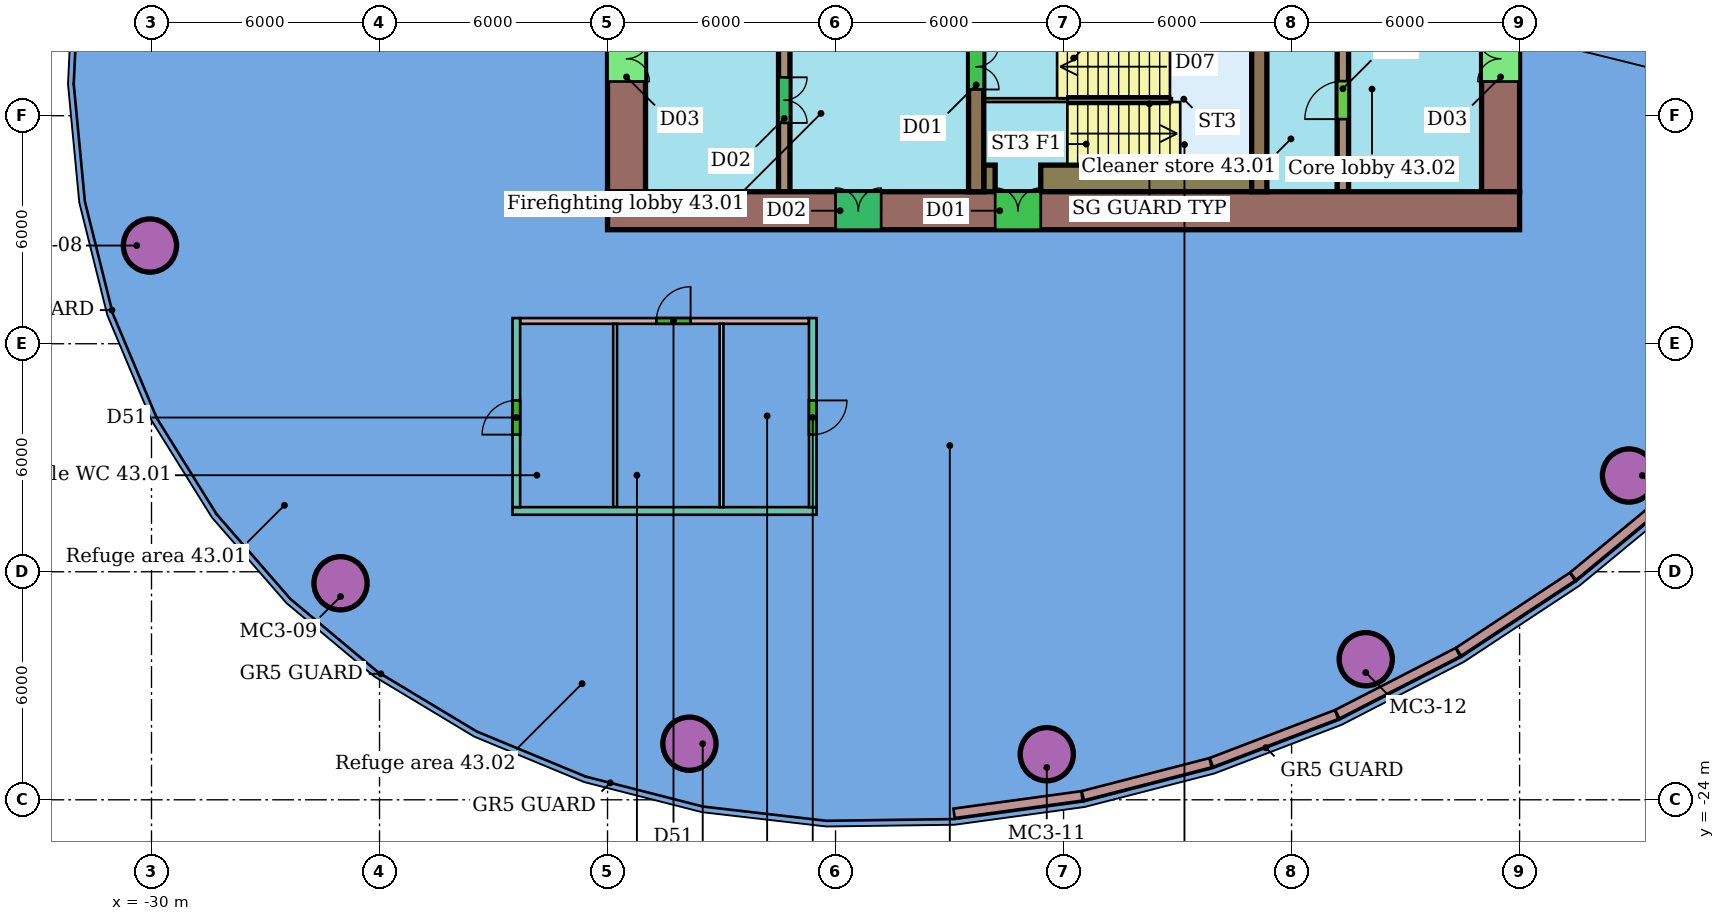
"""IFC4 building model, lengths in metres.
Left out: names, types, materials, properties, quantities, classifications, styles, units other than length and angle.
Written with IfcOpenShell. Run it as: python <this file> out.ifc"""

import sys

from ifc_helpers import new_model, si_unit, direction, frame, frame_2d, origin, origin_2d, place, context, subcontext, project, spatial, rectangle, hollow_circle, extrude, element, fill, save


model = new_model("IFC4")
c1 = context("Model", 3, precision=1e-05, world=origin(), true_north=direction((0.0, 1.0)))
c2 = subcontext(c1, "Body", "Model", "MODEL_VIEW")
j1 = project(units=[si_unit("LENGTHUNIT", "METRE"), si_unit("PLANEANGLEUNIT", "RADIAN")], contexts=[c1])
p1 = place(None, origin())
s1 = spatial("IfcSite", under=j1, at=p1, CompositionType="ELEMENT")
p2 = place(p1, origin())
s2 = spatial("IfcBuilding", under=s1, at=p2, CompositionType="ELEMENT")
p3 = place(p2, frame((0.0, 0.0, 179.4)))
s3 = spatial("IfcBuildingStorey", under=s2, at=p3, CompositionType="ELEMENT", Elevation=179.4)
for number, where, z_axis, x_axis in (
    (1, (-30.041, -9.417, 0.0), (0.0, 0.0, 1.0), (1.0, 0.0, 0.0)),
    (2, (-25.026, -18.303, 0.0), (0.0, 0.0, 1.0), (1.0, 0.0, 0.0)),
    (3, (-15.845, -22.524, 0.0), (0.0, 0.0, 1.0), (1.0, 0.0, 0.0)),
    (4, (-6.442, -22.8, 0.0), (0.0, 0.0, 1.0), (1.0, 0.0, 0.0)),
    (5, (1.952, -20.301, 0.0), (0.0, 0.0, 1.0), (1.0, 0.0, 0.0)),
    (6, (8.879, -15.467, 0.0), (0.0, 0.0, 1.0), (1.0, 0.0, 0.0)),
):
    element("IfcColumn", number, at=place(p3, frame(where, z_axis=z_axis, x_axis=x_axis)), inside=s3, PredefinedType="COLUMN", context=c2, shape_type="SweptSolid", body=[
        extrude(hollow_circle(Radius=0.7, WallThickness=0.05, at=origin_2d()), origin(), (0.0, 0.0, 1.0), 3.45),
    ])
p4 = place(p3, frame((-20.3, -11.4, 0.0), z_axis=(0.0, 0.0, 1.0), x_axis=(1.0, 0.0, 0.0)))
e7 = element("IfcWall", 7, at=p4, inside=s3, PredefinedType="PARTITIONING", context=c2, shape_type="SweptSolid", body=[
    extrude(rectangle(XDim=7.6, YDim=0.15, at=frame_2d((3.8, 0.0))), origin(), (0.0, 0.0, 1.0), 2.862),
])
p5 = place(p4, frame((3.586, 0.0, 0.0)))
e8 = element("IfcOpeningElement", 8, at=p5, cuts=e7, PredefinedType="OPENING", context=c2, shape_type="SweptSolid", body=[
    extrude(rectangle(XDim=0.9, YDim=2.1, at=frame_2d((0.45, 1.05))), frame((0.0, 0.085, 0.0), z_axis=(0.0, -1.0, 0.0), x_axis=(1.0, 0.0, 0.0)), (0.0, 0.0, 1.0), 0.17),
])
p6 = place(p3, frame((-17.8, -16.3, 0.0), z_axis=(0.0, 0.0, 1.0), x_axis=(0.0, 1.0, 0.0)))
e9 = element("IfcWall", 9, at=p6, inside=s3, PredefinedType="PARTITIONING", context=c2, shape_type="SweptSolid", body=[
    extrude(rectangle(XDim=4.825, YDim=0.1, at=frame_2d((2.413, 0.0))), origin(), (0.0, 0.0, 1.0), 2.862),
])
p7 = place(p3, frame((-20.5, -16.4, 0.0), z_axis=(0.0, 0.0, 1.0), x_axis=(1.0, 0.0, 0.0)))
e10 = element("IfcWall", 10, at=p7, inside=s3, PredefinedType="PARTITIONING", context=c2, shape_type="SweptSolid", body=[
    extrude(rectangle(XDim=8.0, YDim=0.2, at=frame_2d((4.0, 0.0))), origin(), (0.0, 0.0, 1.0), 2.862),
])
p8 = place(p3, frame((-20.4, -16.3, 0.0), z_axis=(0.0, 0.0, 1.0), x_axis=(0.0, 1.0, 0.0)))
e11 = element("IfcWall", 11, at=p8, inside=s3, PredefinedType="PARTITIONING", context=c2, shape_type="SweptSolid", body=[
    extrude(rectangle(XDim=4.975, YDim=0.2, at=frame_2d((2.488, 0.0))), origin(), (0.0, 0.0, 1.0), 2.862),
])
p9 = place(p8, frame((1.908, 0.0, 0.0)))
e12 = element("IfcOpeningElement", 12, at=p9, cuts=e11, PredefinedType="OPENING", context=c2, shape_type="SweptSolid", body=[
    extrude(rectangle(XDim=0.9, YDim=2.1, at=frame_2d((0.45, 1.05))), frame((0.0, 0.11, 0.0), z_axis=(0.0, -1.0, 0.0), x_axis=(1.0, 0.0, 0.0)), (0.0, 0.0, 1.0), 0.22),
])
p10 = place(p3, frame((-15.0, -16.3, 0.0), z_axis=(0.0, 0.0, 1.0), x_axis=(0.0, 1.0, 0.0)))
e13 = element("IfcWall", 13, at=p10, inside=s3, PredefinedType="PARTITIONING", context=c2, shape_type="SweptSolid", body=[
    extrude(rectangle(XDim=4.825, YDim=0.1, at=frame_2d((2.413, 0.0))), origin(), (0.0, 0.0, 1.0), 2.862),
])
p11 = place(p3, frame((-12.6, -11.325, 0.0), z_axis=(0.0, 0.0, 1.0), x_axis=(0.0, -1.0, 0.0)))
e14 = element("IfcWall", 14, at=p11, inside=s3, PredefinedType="PARTITIONING", context=c2, shape_type="SweptSolid", body=[
    extrude(rectangle(XDim=4.975, YDim=0.2, at=frame_2d((2.488, 0.0))), origin(), (0.0, 0.0, 1.0), 2.862),
])
p12 = place(p11, frame((2.167, 0.0, 0.0)))
e15 = element("IfcOpeningElement", 15, at=p12, cuts=e14, PredefinedType="OPENING", context=c2, shape_type="SweptSolid", body=[
    extrude(rectangle(XDim=0.9, YDim=2.1, at=frame_2d((0.45, 1.05))), frame((0.0, 0.11, 0.0), z_axis=(0.0, -1.0, 0.0), x_axis=(1.0, 0.0, 0.0)), (0.0, 0.0, 1.0), 0.22),
])
p13 = place(p3, frame((-8.881, -24.356, 0.0), z_axis=(0.0, 0.0, 1.0), x_axis=(0.990801720843, 0.135321653757, 0.0)))
e16 = element("IfcWall", 16, at=p13, inside=s3, PredefinedType="SOLIDWALL", context=c2, shape_type="SweptSolid", body=[
    extrude(rectangle(XDim=3.397, YDim=0.25, at=frame_2d((1.699, 0.0))), origin(), (0.0, 0.0, 1.0), 3.1),
])
p14 = place(p3, frame((-5.493, -23.892, 0.0), z_axis=(0.0, 0.0, 1.0), x_axis=(0.968247112596, 0.249995057849, 0.0)))
e17 = element("IfcWall", 17, at=p14, inside=s3, PredefinedType="SOLIDWALL", context=c2, shape_type="SweptSolid", body=[
    extrude(rectangle(XDim=3.47, YDim=0.25, at=frame_2d((1.735, 0.0))), origin(), (0.0, 0.0, 1.0), 3.1),
])
p15 = place(p3, frame((-2.112, -23.018, 0.0), z_axis=(0.0, 0.0, 1.0), x_axis=(0.933996829101, 0.357281294262, 0.0)))
e18 = element("IfcWall", 18, at=p15, inside=s3, PredefinedType="SOLIDWALL", context=c2, shape_type="SweptSolid", body=[
    extrude(rectangle(XDim=3.528, YDim=0.25, at=frame_2d((1.764, 0.0))), origin(), (0.0, 0.0, 1.0), 3.1),
])
p16 = place(p3, frame((1.203, -21.748, 0.0), z_axis=(0.0, 0.0, 1.0), x_axis=(0.889237716381, 0.457445388833, 0.0)))
e19 = element("IfcWall", 19, at=p16, inside=s3, PredefinedType="SOLIDWALL", context=c2, shape_type="SweptSolid", body=[
    extrude(rectangle(XDim=3.569, YDim=0.25, at=frame_2d((1.784, 0.0))), origin(), (0.0, 0.0, 1.0), 3.1),
])
p17 = place(p3, frame((4.395, -20.105, 0.0), z_axis=(0.0, 0.0, 1.0), x_axis=(0.834771348856, 0.55059676273, 0.0)))
e20 = element("IfcWall", 20, at=p17, inside=s3, PredefinedType="SOLIDWALL", context=c2, shape_type="SweptSolid", body=[
    extrude(rectangle(XDim=3.589, YDim=0.25, at=frame_2d((1.795, 0.0))), origin(), (0.0, 0.0, 1.0), 3.1),
])
p18 = place(p3, frame((7.409, -18.116, 0.0), z_axis=(0.0, 0.0, 1.0), x_axis=(0.771012569009, 0.63681992622, 0.0)))
e21 = element("IfcWall", 21, at=p18, inside=s3, PredefinedType="SOLIDWALL", context=c2, shape_type="SweptSolid", body=[
    extrude(rectangle(XDim=3.59, YDim=0.25, at=frame_2d((1.795, 0.0))), origin(), (0.0, 0.0, 1.0), 3.1),
])
p19 = place(p3, frame((-18.0, -8.5, 0.0), z_axis=(0.0, 0.0, 1.0), x_axis=(1.0, 0.0, 0.0)))
e22 = element("IfcWall", 22, at=p19, inside=s3, PredefinedType="SHEAR", context=c2, shape_type="SweptSolid", body=[
    extrude(rectangle(XDim=24.0, YDim=1.0, at=frame_2d((12.0, 0.0))), origin(), (0.0, 0.0, 1.0), 3.3),
])
p20 = place(p19, frame((10.2, 0.0, 0.0)))
e23 = element("IfcOpeningElement", 23, at=p20, cuts=e22, PredefinedType="OPENING", context=c2, shape_type="SweptSolid", body=[
    extrude(rectangle(XDim=1.2, YDim=2.1, at=frame_2d((0.6, 1.05))), frame((0.0, 0.51, 0.0), z_axis=(0.0, -1.0, 0.0), x_axis=(1.0, 0.0, 0.0)), (0.0, 0.0, 1.0), 1.02),
])
p21 = place(p19, frame((6.0, 0.0, 0.0)))
e24 = element("IfcOpeningElement", 24, at=p21, cuts=e22, PredefinedType="OPENING", context=c2, shape_type="SweptSolid", body=[
    extrude(rectangle(XDim=1.2, YDim=2.1, at=frame_2d((0.6, 1.05))), frame((0.0, 0.51, 0.0), z_axis=(0.0, -1.0, 0.0), x_axis=(1.0, 0.0, 0.0)), (0.0, 0.0, 1.0), 1.02),
])
p22 = place(p3, frame((-17.5, 8.0, 0.0), z_axis=(0.0, 0.0, 1.0), x_axis=(0.0, -1.0, 0.0)))
e25 = element("IfcWall", 25, at=p22, inside=s3, PredefinedType="SHEAR", context=c2, shape_type="SweptSolid", body=[
    extrude(rectangle(XDim=16.0, YDim=1.0, at=frame_2d((8.0, 0.0))), origin(), (0.0, 0.0, 1.0), 3.3),
])
p23 = place(p22, frame((11.9, 0.0, 0.0)))
e26 = element("IfcOpeningElement", 26, at=p23, cuts=e25, PredefinedType="OPENING", context=c2, shape_type="SweptSolid", body=[
    extrude(rectangle(XDim=1.2, YDim=2.1, at=frame_2d((0.6, 1.05))), frame((0.0, 0.51, 0.0), z_axis=(0.0, -1.0, 0.0), x_axis=(1.0, 0.0, 0.0)), (0.0, 0.0, 1.0), 1.02),
])
p24 = place(p22, frame((2.9, 0.0, 0.0)))
e27 = element("IfcOpeningElement", 27, at=p24, cuts=e25, PredefinedType="OPENING", context=c2, shape_type="SweptSolid", body=[
    extrude(rectangle(XDim=1.2, YDim=2.1, at=frame_2d((0.6, 1.05))), frame((0.0, 0.51, 0.0), z_axis=(0.0, -1.0, 0.0), x_axis=(1.0, 0.0, 0.0)), (0.0, 0.0, 1.0), 1.02),
])
p25 = place(p3, frame((5.5, -8.0, 0.0), z_axis=(0.0, 0.0, 1.0), x_axis=(0.0, 1.0, 0.0)))
e28 = element("IfcWall", 28, at=p25, inside=s3, PredefinedType="SHEAR", context=c2, shape_type="SweptSolid", body=[
    extrude(rectangle(XDim=16.0, YDim=1.0, at=frame_2d((8.0, 0.0))), origin(), (0.0, 0.0, 1.0), 3.3),
])
p26 = place(p25, frame((2.9, 0.0, 0.0)))
e29 = element("IfcOpeningElement", 29, at=p26, cuts=e28, PredefinedType="OPENING", context=c2, shape_type="SweptSolid", body=[
    extrude(rectangle(XDim=1.2, YDim=2.1, at=frame_2d((0.6, 1.05))), frame((0.0, 0.51, 0.0), z_axis=(0.0, -1.0, 0.0), x_axis=(1.0, 0.0, 0.0)), (0.0, 0.0, 1.0), 1.02),
])
p27 = place(p25, frame((11.9, 0.0, 0.0)))
e30 = element("IfcOpeningElement", 30, at=p27, cuts=e28, PredefinedType="OPENING", context=c2, shape_type="SweptSolid", body=[
    extrude(rectangle(XDim=1.2, YDim=2.1, at=frame_2d((0.6, 1.05))), frame((0.0, 0.51, 0.0), z_axis=(0.0, -1.0, 0.0), x_axis=(1.0, 0.0, 0.0)), (0.0, 0.0, 1.0), 1.02),
])
p28 = place(p3, frame((-13.35, 8.0, 0.0), z_axis=(0.0, 0.0, 1.0), x_axis=(0.0, -1.0, 0.0)))
e31 = element("IfcWall", 31, at=p28, inside=s3, PredefinedType="SHEAR", context=c2, shape_type="SweptSolid", body=[
    extrude(rectangle(XDim=16.0, YDim=0.3, at=frame_2d((8.0, 0.0))), origin(), (0.0, 0.0, 1.0), 3.3),
])
p29 = place(p28, frame((2.69, 0.0, 0.0)))
e32 = element("IfcOpeningElement", 32, at=p29, cuts=e31, PredefinedType="OPENING", context=c2, shape_type="SweptSolid", body=[
    extrude(rectangle(XDim=1.2, YDim=2.1, at=frame_2d((0.6, 1.05))), frame((0.0, 0.16, 0.0), z_axis=(0.0, -1.0, 0.0), x_axis=(1.0, 0.0, 0.0)), (0.0, 0.0, 1.0), 0.32),
])
p30 = place(p28, frame((12.99, 0.0, 0.0)))
e33 = element("IfcOpeningElement", 33, at=p30, cuts=e31, PredefinedType="OPENING", context=c2, shape_type="SweptSolid", body=[
    extrude(rectangle(XDim=1.2, YDim=2.1, at=frame_2d((0.6, 1.05))), frame((0.0, 0.16, 0.0), z_axis=(0.0, -1.0, 0.0), x_axis=(1.0, 0.0, 0.0)), (0.0, 0.0, 1.0), 0.32),
])
p31 = place(p28, frame((7.25, 0.0, 0.0)))
e34 = element("IfcOpeningElement", 34, at=p31, cuts=e31, PredefinedType="OPENING", context=c2, shape_type="SweptSolid", body=[
    extrude(rectangle(XDim=1.5, YDim=2.1, at=frame_2d((0.75, 1.05))), frame((0.0, 0.16, 0.0), z_axis=(0.0, -1.0, 0.0), x_axis=(1.0, 0.0, 0.0)), (0.0, 0.0, 1.0), 0.32),
])
p32 = place(p3, frame((1.35, -8.0, 0.0), z_axis=(0.0, 0.0, 1.0), x_axis=(0.0, 1.0, 0.0)))
e35 = element("IfcWall", 35, at=p32, inside=s3, PredefinedType="SHEAR", context=c2, shape_type="SweptSolid", body=[
    extrude(rectangle(XDim=16.0, YDim=0.3, at=frame_2d((8.0, 0.0))), origin(), (0.0, 0.0, 1.0), 3.3),
])
p33 = place(p32, frame((12.11, 0.0, 0.0)))
e36 = element("IfcOpeningElement", 36, at=p33, cuts=e35, PredefinedType="OPENING", context=c2, shape_type="SweptSolid", body=[
    extrude(rectangle(XDim=1.2, YDim=2.1, at=frame_2d((0.6, 1.05))), frame((0.0, 0.16, 0.0), z_axis=(0.0, -1.0, 0.0), x_axis=(1.0, 0.0, 0.0)), (0.0, 0.0, 1.0), 0.32),
])
p34 = place(p32, frame((1.91, 0.0, 0.0)))
e37 = element("IfcOpeningElement", 37, at=p34, cuts=e35, PredefinedType="OPENING", context=c2, shape_type="SweptSolid", body=[
    extrude(rectangle(XDim=1.0, YDim=2.1, at=frame_2d((0.5, 1.05))), frame((0.0, 0.16, 0.0), z_axis=(0.0, -1.0, 0.0), x_axis=(1.0, 0.0, 0.0)), (0.0, 0.0, 1.0), 0.32),
])
p35 = place(p32, frame((7.25, 0.0, 0.0)))
e38 = element("IfcOpeningElement", 38, at=p35, cuts=e35, PredefinedType="OPENING", context=c2, shape_type="SweptSolid", body=[
    extrude(rectangle(XDim=1.5, YDim=2.1, at=frame_2d((0.75, 1.05))), frame((0.0, 0.16, 0.0), z_axis=(0.0, -1.0, 0.0), x_axis=(1.0, 0.0, 0.0)), (0.0, 0.0, 1.0), 0.32),
])
p36 = place(p3, frame((-8.3, -3.88, 0.0), z_axis=(0.0, 0.0, 1.0), x_axis=(0.0, -1.0, 0.0)))
e39 = element("IfcWall", 39, at=p36, inside=s3, PredefinedType="SHEAR", context=c2, shape_type="SweptSolid", body=[
    extrude(rectangle(XDim=4.12, YDim=0.4, at=frame_2d((2.06, 0.0))), origin(), (0.0, 0.0, 1.0), 3.3),
])
p37 = place(p36, frame((0.23, 0.0, 0.0)))
e40 = element("IfcOpeningElement", 40, at=p37, cuts=e39, PredefinedType="OPENING", context=c2, shape_type="SweptSolid", body=[
    extrude(rectangle(XDim=1.2, YDim=2.1, at=frame_2d((0.6, 1.05))), frame((0.0, 0.21, 0.0), z_axis=(0.0, -1.0, 0.0), x_axis=(1.0, 0.0, 0.0)), (0.0, 0.0, 1.0), 0.42),
])
p38 = place(p3, frame((-0.85, -3.88, 0.0), z_axis=(0.0, 0.0, 1.0), x_axis=(0.0, -1.0, 0.0)))
e41 = element("IfcWall", 41, at=p38, inside=s3, PredefinedType="SHEAR", context=c2, shape_type="SweptSolid", body=[
    extrude(rectangle(XDim=4.12, YDim=0.4, at=frame_2d((2.06, 0.0))), origin(), (0.0, 0.0, 1.0), 3.3),
])
p39 = place(p3, frame((-8.1, -7.65, 0.0), z_axis=(0.0, 0.0, 1.0), x_axis=(1.0, 0.0, 0.0)))
e42 = element("IfcWall", 42, at=p39, inside=s3, PredefinedType="SHEAR", context=c2, shape_type="SweptSolid", body=[
    extrude(rectangle(XDim=0.3, YDim=0.7, at=frame_2d((0.15, 0.0))), origin(), (0.0, 0.0, 1.0), 3.3),
])
p40 = place(p3, frame((-6.6, -7.65, 0.0), z_axis=(0.0, 0.0, 1.0), x_axis=(1.0, 0.0, 0.0)))
e43 = element("IfcWall", 43, at=p40, inside=s3, PredefinedType="SHEAR", context=c2, shape_type="SweptSolid", body=[
    extrude(rectangle(XDim=5.55, YDim=0.7, at=frame_2d((2.775, 0.0))), origin(), (0.0, 0.0, 1.0), 3.3),
])
p41 = place(p3, frame((-8.1, -5.59, 0.0), z_axis=(0.0, 0.0, 1.0), x_axis=(1.0, 0.0, 0.0)))
e44 = element("IfcWall", 44, at=p41, inside=s3, PredefinedType="SHEAR", context=c2, shape_type="SweptSolid", body=[
    extrude(rectangle(XDim=2.2, YDim=0.1, at=frame_2d((1.1, 0.0))), origin(), (0.0, 0.0, 1.0), 3.3),
])
p42 = place(p5, origin())
e45 = element("IfcDoor", 45, at=p42, inside=s3, OperationType="SINGLE_SWING_RIGHT", PredefinedType="DOOR", context=c2, shape_type="SweptSolid", body=[
    extrude(rectangle(XDim=0.9, YDim=2.1, at=frame_2d((0.45, 1.05))), frame((0.0, 0.025, 0.0), z_axis=(0.0, -1.0, 0.0), x_axis=(1.0, 0.0, 0.0)), (0.0, 0.0, 1.0), 0.05),
])
fill(e8, e45)
p43 = place(p9, origin())
e46 = element("IfcDoor", 46, at=p43, inside=s3, OperationType="SINGLE_SWING_LEFT", PredefinedType="DOOR", context=c2, shape_type="SweptSolid", body=[
    extrude(rectangle(XDim=0.9, YDim=2.1, at=frame_2d((0.45, 1.05))), frame((0.0, 0.025, 0.0), z_axis=(0.0, -1.0, 0.0), x_axis=(1.0, 0.0, 0.0)), (0.0, 0.0, 1.0), 0.05),
])
fill(e12, e46)
p44 = place(p12, origin())
e47 = element("IfcDoor", 47, at=p44, inside=s3, OperationType="SINGLE_SWING_LEFT", PredefinedType="DOOR", context=c2, shape_type="SweptSolid", body=[
    extrude(rectangle(XDim=0.9, YDim=2.1, at=frame_2d((0.45, 1.05))), frame((0.0, 0.025, 0.0), z_axis=(0.0, -1.0, 0.0), x_axis=(1.0, 0.0, 0.0)), (0.0, 0.0, 1.0), 0.05),
])
fill(e15, e47)
p45 = place(p20, origin())
e48 = element("IfcDoor", 48, at=p45, inside=s3, OperationType="DOUBLE_DOOR_SINGLE_SWING", PredefinedType="NOTDEFINED", context=c2, shape_type="SweptSolid", body=[
    extrude(rectangle(XDim=1.2, YDim=2.1, at=frame_2d((0.6, 1.05))), frame((0.0, 0.025, 0.0), z_axis=(0.0, -1.0, 0.0), x_axis=(1.0, 0.0, 0.0)), (0.0, 0.0, 1.0), 0.05),
])
fill(e23, e48)
p46 = place(p21, origin())
e49 = element("IfcDoor", 49, at=p46, inside=s3, OperationType="DOUBLE_DOOR_SINGLE_SWING", PredefinedType="NOTDEFINED", context=c2, shape_type="SweptSolid", body=[
    extrude(rectangle(XDim=1.2, YDim=2.1, at=frame_2d((0.6, 1.05))), frame((0.0, 0.025, 0.0), z_axis=(0.0, -1.0, 0.0), x_axis=(1.0, 0.0, 0.0)), (0.0, 0.0, 1.0), 0.05),
])
fill(e24, e49)
p47 = place(p23, origin())
e50 = element("IfcDoor", 50, at=p47, inside=s3, OperationType="DOUBLE_DOOR_SINGLE_SWING", PredefinedType="NOTDEFINED", context=c2, shape_type="SweptSolid", body=[
    extrude(rectangle(XDim=1.2, YDim=2.1, at=frame_2d((0.6, 1.05))), frame((0.0, 0.025, 0.0), z_axis=(0.0, -1.0, 0.0), x_axis=(1.0, 0.0, 0.0)), (0.0, 0.0, 1.0), 0.05),
])
fill(e26, e50)
p48 = place(p26, origin())
e51 = element("IfcDoor", 51, at=p48, inside=s3, OperationType="DOUBLE_DOOR_SINGLE_SWING", PredefinedType="NOTDEFINED", context=c2, shape_type="SweptSolid", body=[
    extrude(rectangle(XDim=1.2, YDim=2.1, at=frame_2d((0.6, 1.05))), frame((0.0, 0.025, 0.0), z_axis=(0.0, -1.0, 0.0), x_axis=(1.0, 0.0, 0.0)), (0.0, 0.0, 1.0), 0.05),
])
fill(e29, e51)
p49 = place(p30, origin())
e52 = element("IfcDoor", 52, at=p49, inside=s3, OperationType="DOUBLE_DOOR_SINGLE_SWING", PredefinedType="NOTDEFINED", context=c2, shape_type="SweptSolid", body=[
    extrude(rectangle(XDim=1.2, YDim=2.1, at=frame_2d((0.6, 1.05))), frame((0.0, 0.025, 0.0), z_axis=(0.0, -1.0, 0.0), x_axis=(1.0, 0.0, 0.0)), (0.0, 0.0, 1.0), 0.05),
])
fill(e33, e52)
p50 = place(p34, origin())
e53 = element("IfcDoor", 53, at=p50, inside=s3, OperationType="SINGLE_SWING_LEFT", PredefinedType="NOTDEFINED", context=c2, shape_type="SweptSolid", body=[
    extrude(rectangle(XDim=1.0, YDim=2.1, at=frame_2d((0.5, 1.05))), frame((0.0, 0.025, 0.0), z_axis=(0.0, -1.0, 0.0), x_axis=(1.0, 0.0, 0.0)), (0.0, 0.0, 1.0), 0.05),
])
fill(e37, e53)
p51 = place(p37, origin())
e54 = element("IfcDoor", 54, at=p51, inside=s3, OperationType="DOUBLE_DOOR_SINGLE_SWING", PredefinedType="NOTDEFINED", context=c2, shape_type="SweptSolid", body=[
    extrude(rectangle(XDim=1.2, YDim=2.1, at=frame_2d((0.6, 1.05))), frame((0.0, 0.025, 0.0), z_axis=(0.0, -1.0, 0.0), x_axis=(1.0, 0.0, 0.0)), (0.0, 0.0, 1.0), 0.05),
])
fill(e40, e54)
save(model, sys.argv[1])
